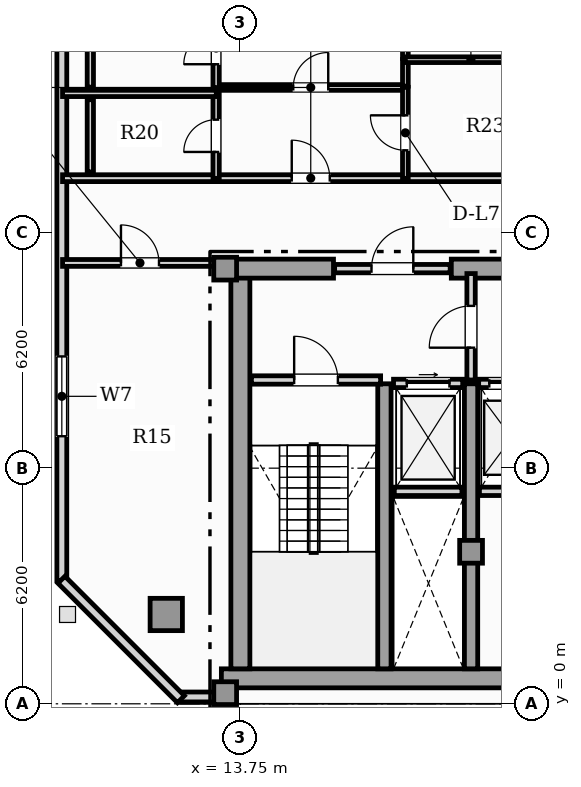
"""IFC4 building model, lengths in metres.
Left out: names, types, materials, properties, quantities, classifications, styles, units other than length and angle.
Written with IfcOpenShell. Run it as: python <this file> out.ifc"""

import sys

from ifc_helpers import new_model, si_unit, direction, frame, frame_2d, origin, origin_2d, place, context, subcontext, project, spatial, rectangle, hollow_rectangle, extrude, element, fill, save


model = new_model("IFC4")
c1 = context("Model", 3, precision=1e-05, world=origin(), true_north=direction((0.0, 1.0)))
c2 = subcontext(c1, "Body", "Model", "MODEL_VIEW")
j1 = project(units=[si_unit("LENGTHUNIT", "METRE"), si_unit("PLANEANGLEUNIT", "RADIAN")], contexts=[c1])
p1 = place(None, origin())
s1 = spatial("IfcSite", under=j1, at=p1, CompositionType="ELEMENT")
p2 = place(p1, origin())
s2 = spatial("IfcBuilding", under=s1, at=p2, CompositionType="ELEMENT")
p3 = place(p2, frame((0.0, 0.0, 313.05)))
s3 = spatial("IfcBuildingStorey", under=s2, at=p3, CompositionType="ELEMENT", Elevation=313.05)
p4 = place(p3, frame((13.25, 0.67, 0.0), z_axis=(0.0, 0.0, 1.0), x_axis=(1.0, 0.0, 0.0)))
e1 = element("IfcWall", 1, at=p4, inside=s3, PredefinedType="SHEAR", context=c2, shape_type="SweptSolid", body=[
    extrude(rectangle(XDim=31.0, YDim=0.5, at=frame_2d((15.5, 0.0))), origin(), (0.0, 0.0, 1.0), 3.65),
])
p5 = place(p3, frame((13.75, 0.92, 0.0), z_axis=(0.0, 0.0, 1.0), x_axis=(0.0, 1.0, 0.0)))
e2 = element("IfcWall", 2, at=p5, inside=s3, PredefinedType="SHEAR", context=c2, shape_type="SweptSolid", body=[
    extrude(rectangle(XDim=10.53, YDim=0.5, at=frame_2d((5.265, 0.0))), origin(), (0.0, 0.0, 1.0), 3.65),
])
p6 = place(p3, frame((13.25, 11.45, 0.0), z_axis=(0.0, 0.0, 1.0), x_axis=(1.0, 0.0, 0.0)))
e3 = element("IfcWall", 3, at=p6, inside=s3, PredefinedType="SHEAR", context=c2, shape_type="SweptSolid", body=[
    extrude(rectangle(XDim=2.95, YDim=0.5, at=frame_2d((1.475, 0.0))), origin(), (0.0, 0.0, 1.0), 3.65),
])
p7 = place(p3, frame((19.3, 11.45, 0.0), z_axis=(0.0, 0.0, 1.0), x_axis=(1.0, 0.0, 0.0)))
e4 = element("IfcWall", 4, at=p7, inside=s3, PredefinedType="SHEAR", context=c2, shape_type="SweptSolid", body=[
    extrude(rectangle(XDim=7.3, YDim=0.5, at=frame_2d((3.65, 0.0))), origin(), (0.0, 0.0, 1.0), 3.65),
])
for number, where, z_axis, x_axis in (
    (5, (17.54, 0.92, 0.0), (0.0, 0.0, 1.0), (0.0, 1.0, 0.0)),
    (6, (19.82, 0.92, 0.0), (0.0, 0.0, 1.0), (0.0, 1.0, 0.0)),
):
    element("IfcWall", number, at=place(p3, frame(where, z_axis=z_axis, x_axis=x_axis)), inside=s3, PredefinedType="SHEAR", context=c2, shape_type="SweptSolid", body=[
        extrude(rectangle(XDim=7.5, YDim=0.35, at=frame_2d((3.75, 0.0))), origin(), (0.0, 0.0, 1.0), 3.65),
    ])
for number, where, z_axis, x_axis in (
    (7, (13.35, 0.28, 0.0), (0.0, 0.0, 1.0), (1.0, 0.0, 0.0)),
    (8, (13.35, 11.45, 0.0), (0.0, 0.0, 1.0), (1.0, 0.0, 0.0)),
    (9, (19.82, 4.0, 0.0), (0.0, 0.0, 1.0), (1.0, 0.0, 0.0)),
):
    element("IfcColumn", number, at=place(p3, frame(where, z_axis=z_axis, x_axis=x_axis)), inside=s3, PredefinedType="COLUMN", context=c2, shape_type="SweptSolid", body=[
        extrude(rectangle(XDim=0.6, YDim=0.6, at=origin_2d()), origin(), (0.0, 0.0, 1.0), 3.85),
    ])
p8 = place(p3, frame((11.8, 2.35, 0.0), z_axis=(0.0, 0.0, 1.0), x_axis=(1.0, 0.0, 0.0)))
e10 = element("IfcColumn", 10, at=p8, inside=s3, PredefinedType="USERDEFINED", context=c2, shape_type="SweptSolid", body=[
    extrude(hollow_rectangle(XDim=0.85, YDim=0.85, WallThickness=0.05, at=origin_2d()), origin(), (0.0, 0.0, 1.0), 3.85),
])
p9 = place(p3, frame((12.162, 0.18, 0.0), z_axis=(0.0, 0.0, 1.0), x_axis=(1.0, 0.0, 0.0)))
e11 = element("IfcWall", 11, at=p9, inside=s3, PredefinedType="SOLIDWALL", context=c2, shape_type="SweptSolid", body=[
    extrude(rectangle(XDim=1.088, YDim=0.26, at=frame_2d((0.544, 0.0))), origin(), (0.0, 0.0, 1.0), 3.65),
])
p10 = place(p3, frame((9.052, 29.847, 0.0), z_axis=(0.0, 0.0, 1.0), x_axis=(0.0, -1.0, 0.0)))
e12 = element("IfcWall", 12, at=p10, inside=s3, PredefinedType="SOLIDWALL", context=c2, shape_type="SweptSolid", body=[
    extrude(rectangle(XDim=26.607, YDim=0.26, at=frame_2d((13.304, 0.0))), origin(), (0.0, 0.0, 1.0), 3.65),
])
p11 = place(p10, frame((20.707, 0.0, 0.85)))
e13 = element("IfcOpeningElement", 13, at=p11, cuts=e12, PredefinedType="OPENING", context=c2, shape_type="SweptSolid", body=[
    extrude(rectangle(XDim=2.1, YDim=2.05, at=frame_2d((1.05, 1.025))), frame((0.0, 0.14, 0.0), z_axis=(0.0, -1.0, 0.0), x_axis=(1.0, 0.0, 0.0)), (0.0, 0.0, 1.0), 0.28),
])
p12 = place(p10, frame((1.647, 0.0, 0.95)))
e14 = element("IfcOpeningElement", 14, at=p12, cuts=e12, PredefinedType="OPENING", context=c2, shape_type="SweptSolid", body=[
    extrude(rectangle(XDim=0.9, YDim=1.5, at=frame_2d((0.45, 0.75))), frame((0.0, 0.14, 0.0), z_axis=(0.0, -1.0, 0.0), x_axis=(1.0, 0.0, 0.0)), (0.0, 0.0, 1.0), 0.28),
])
p13 = place(p10, frame((6.453, 0.0, 0.9)))
e15 = element("IfcOpeningElement", 15, at=p13, cuts=e12, PredefinedType="OPENING", context=c2, shape_type="SweptSolid", body=[
    extrude(rectangle(XDim=1.5, YDim=1.95, at=frame_2d((0.75, 0.975))), frame((0.0, 0.14, 0.0), z_axis=(0.0, -1.0, 0.0), x_axis=(1.0, 0.0, 0.0)), (0.0, 0.0, 1.0), 0.28),
])
p14 = place(p3, frame((9.042, 3.264, 0.0), z_axis=(0.0, 0.0, 1.0), x_axis=(0.707106781187, -0.707106781187, 0.0)))
e16 = element("IfcWall", 16, at=p14, inside=s3, PredefinedType="SOLIDWALL", context=c2, shape_type="SweptSolid", body=[
    extrude(rectangle(XDim=4.446, YDim=0.26, at=frame_2d((2.223, 0.0))), origin(), (0.0, 0.0, 1.0), 3.65),
])
p15 = place(p3, frame((17.8, 5.59, 0.0), z_axis=(0.0, 0.0, 1.0), x_axis=(1.0, 0.0, 0.0)))
e17 = element("IfcWall", 17, at=p15, inside=s3, PredefinedType="SOLIDWALL", context=c2, shape_type="SweptSolid", body=[
    extrude(rectangle(XDim=1.78, YDim=0.22, at=frame_2d((0.89, 0.0))), origin(), (0.0, 0.0, 1.0), 3.65),
])
p16 = place(p3, frame((17.78, 8.43, 0.0), z_axis=(0.0, 0.0, 1.0), x_axis=(1.0, 0.0, 0.0)))
e18 = element("IfcWall", 18, at=p16, inside=s3, PredefinedType="SOLIDWALL", context=c2, shape_type="SweptSolid", body=[
    extrude(rectangle(XDim=1.82, YDim=0.22, at=frame_2d((0.91, 0.0))), origin(), (0.0, 0.0, 1.0), 3.65),
])
p17 = place(p16, frame((0.35, 0.0, 0.0)))
e19 = element("IfcOpeningElement", 19, at=p17, cuts=e18, PredefinedType="OPENING", context=c2, shape_type="SweptSolid", body=[
    extrude(rectangle(XDim=1.12, YDim=2.25, at=frame_2d((0.56, 1.125))), frame((0.0, 0.12, 0.0), z_axis=(0.0, -1.0, 0.0), x_axis=(1.0, 0.0, 0.0)), (0.0, 0.0, 1.0), 0.24),
])
p18 = place(p3, frame((20.04, 5.59, 0.0), z_axis=(0.0, 0.0, 1.0), x_axis=(1.0, 0.0, 0.0)))
e20 = element("IfcWall", 20, at=p18, inside=s3, PredefinedType="SOLIDWALL", context=c2, shape_type="SweptSolid", body=[
    extrude(rectangle(XDim=1.7, YDim=0.22, at=frame_2d((0.85, 0.0))), origin(), (0.0, 0.0, 1.0), 3.65),
])
p19 = place(p3, frame((20.02, 8.43, 0.0), z_axis=(0.0, 0.0, 1.0), x_axis=(1.0, 0.0, 0.0)))
e21 = element("IfcWall", 21, at=p19, inside=s3, PredefinedType="SOLIDWALL", context=c2, shape_type="SweptSolid", body=[
    extrude(rectangle(XDim=1.74, YDim=0.22, at=frame_2d((0.87, 0.0))), origin(), (0.0, 0.0, 1.0), 3.65),
])
p20 = place(p19, frame((0.28, 0.0, 0.0)))
e22 = element("IfcOpeningElement", 22, at=p20, cuts=e21, PredefinedType="OPENING", context=c2, shape_type="SweptSolid", body=[
    extrude(rectangle(XDim=1.18, YDim=2.2, at=frame_2d((0.59, 1.1))), frame((0.0, 0.12, 0.0), z_axis=(0.0, -1.0, 0.0), x_axis=(1.0, 0.0, 0.0)), (0.0, 0.0, 1.0), 0.24),
])
p21 = place(p3, frame((14.04, 8.52, 0.0), z_axis=(0.0, 0.0, 1.0), x_axis=(1.0, 0.0, 0.0)))
e23 = element("IfcWall", 23, at=p21, inside=s3, PredefinedType="SOLIDWALL", context=c2, shape_type="SweptSolid", body=[
    extrude(rectangle(XDim=3.4, YDim=0.22, at=frame_2d((1.7, 0.0))), origin(), (0.0, 0.0, 1.0), 3.65),
])
p22 = place(p21, frame((1.125, 0.0, 0.0)))
e24 = element("IfcOpeningElement", 24, at=p22, cuts=e23, PredefinedType="OPENING", context=c2, shape_type="SweptSolid", body=[
    extrude(rectangle(XDim=1.15, YDim=2.2, at=frame_2d((0.575, 1.1))), frame((0.0, 0.12, 0.0), z_axis=(0.0, -1.0, 0.0), x_axis=(1.0, 0.0, 0.0)), (0.0, 0.0, 1.0), 0.24),
])
p23 = place(p3, frame((19.82, 8.52, 0.0), z_axis=(0.0, 0.0, 1.0), x_axis=(0.0, 1.0, 0.0)))
e25 = element("IfcWall", 25, at=p23, inside=s3, PredefinedType="SOLIDWALL", context=c2, shape_type="SweptSolid", body=[
    extrude(rectangle(XDim=2.8, YDim=0.22, at=frame_2d((1.4, 0.0))), origin(), (0.0, 0.0, 1.0), 3.105),
])
p24 = place(p23, frame((0.85, 0.0, 0.0)))
e26 = element("IfcOpeningElement", 26, at=p24, cuts=e25, PredefinedType="OPENING", context=c2, shape_type="SweptSolid", body=[
    extrude(rectangle(XDim=1.1, YDim=2.2, at=frame_2d((0.55, 1.1))), frame((0.0, 0.12, 0.0), z_axis=(0.0, -1.0, 0.0), x_axis=(1.0, 0.0, 0.0)), (0.0, 0.0, 1.0), 0.24),
])
p25 = place(p3, frame((16.23, 11.45, 0.0), z_axis=(0.0, 0.0, 1.0), x_axis=(1.0, 0.0, 0.0)))
e27 = element("IfcWall", 27, at=p25, inside=s3, PredefinedType="SOLIDWALL", context=c2, shape_type="SweptSolid", body=[
    extrude(rectangle(XDim=3.04, YDim=0.22, at=frame_2d((1.52, 0.0))), origin(), (0.0, 0.0, 1.0), 3.65),
])
p26 = place(p25, frame((0.97, 0.0, 0.0)))
e28 = element("IfcOpeningElement", 28, at=p26, cuts=e27, PredefinedType="OPENING", context=c2, shape_type="SweptSolid", body=[
    extrude(rectangle(XDim=1.1, YDim=2.2, at=frame_2d((0.55, 1.1))), frame((0.0, 0.12, 0.0), z_axis=(0.0, -1.0, 0.0), x_axis=(1.0, 0.0, 0.0)), (0.0, 0.0, 1.0), 0.24),
])
p27 = place(p3, frame((9.071, 11.6, 0.0), z_axis=(0.0, 0.0, 1.0), x_axis=(1.0, 0.0, 0.0)))
e29 = element("IfcWall", 29, at=p27, inside=s3, PredefinedType="PARTITIONING", context=c2, shape_type="SweptSolid", body=[
    extrude(rectangle(XDim=4.074, YDim=0.18, at=frame_2d((2.037, 0.0))), origin(), (0.0, 0.0, 1.0), 3.65),
])
p28 = place(p27, frame((1.537, 0.0, 0.0)))
e30 = element("IfcOpeningElement", 30, at=p28, cuts=e29, PredefinedType="OPENING", context=c2, shape_type="SweptSolid", body=[
    extrude(rectangle(XDim=1.0, YDim=2.15, at=frame_2d((0.5, 1.075))), frame((0.0, 0.1, 0.0), z_axis=(0.0, -1.0, 0.0), x_axis=(1.0, 0.0, 0.0)), (0.0, 0.0, 1.0), 0.2),
])
p29 = place(p3, frame((13.107, 13.83, 0.0), z_axis=(0.0, 0.0, 1.0), x_axis=(1.0, 0.0, 0.0)))
e31 = element("IfcWall", 31, at=p29, inside=s3, PredefinedType="PARTITIONING", context=c2, shape_type="SweptSolid", body=[
    extrude(rectangle(XDim=4.99, YDim=0.18, at=frame_2d((2.495, 0.0))), origin(), (0.0, 0.0, 1.0), 3.65),
])
p30 = place(p29, frame((1.995, 0.0, 0.0)))
e32 = element("IfcOpeningElement", 32, at=p30, cuts=e31, PredefinedType="OPENING", context=c2, shape_type="SweptSolid", body=[
    extrude(rectangle(XDim=1.0, YDim=2.15, at=frame_2d((0.5, 1.075))), frame((0.0, 0.1, 0.0), z_axis=(0.0, -1.0, 0.0), x_axis=(1.0, 0.0, 0.0)), (0.0, 0.0, 1.0), 0.2),
])
p31 = place(p3, frame((9.071, 13.83, 0.0), z_axis=(0.0, 0.0, 1.0), x_axis=(1.0, 0.0, 0.0)))
e33 = element("IfcWall", 33, at=p31, inside=s3, PredefinedType="PARTITIONING", context=c2, shape_type="SweptSolid", body=[
    extrude(rectangle(XDim=4.005, YDim=0.18, at=frame_2d((2.003, 0.0))), origin(), (0.0, 0.0, 1.0), 3.65),
])
p32 = place(p3, frame((18.127, 13.83, 0.0), z_axis=(0.0, 0.0, 1.0), x_axis=(1.0, 0.0, 0.0)))
e34 = element("IfcWall", 34, at=p32, inside=s3, PredefinedType="PARTITIONING", context=c2, shape_type="SweptSolid", body=[
    extrude(rectangle(XDim=3.418, YDim=0.18, at=frame_2d((1.709, 0.0))), origin(), (0.0, 0.0, 1.0), 3.65),
])
p33 = place(p3, frame((13.107, 16.217, 0.0), z_axis=(0.0, 0.0, 1.0), x_axis=(1.0, 0.0, 0.0)))
e35 = element("IfcWall", 35, at=p33, inside=s3, PredefinedType="PARTITIONING", context=c2, shape_type="SweptSolid", body=[
    extrude(rectangle(XDim=4.99, YDim=0.15, at=frame_2d((2.495, 0.0))), origin(), (0.0, 0.0, 1.0), 3.65),
])
p34 = place(p33, frame((2.035, 0.0, 0.0)))
e36 = element("IfcOpeningElement", 36, at=p34, cuts=e35, PredefinedType="OPENING", context=c2, shape_type="SweptSolid", body=[
    extrude(rectangle(XDim=0.92, YDim=2.1, at=frame_2d((0.46, 1.05))), frame((0.0, 0.085, 0.0), z_axis=(0.0, -1.0, 0.0), x_axis=(1.0, 0.0, 0.0)), (0.0, 0.0, 1.0), 0.17),
])
p35 = place(p3, frame((13.112, 13.825, 0.0), z_axis=(0.0, 0.0, 1.0), x_axis=(0.0, 1.0, 0.0)))
e37 = element("IfcWall", 37, at=p35, inside=s3, PredefinedType="PLUMBINGWALL", context=c2, shape_type="SweptSolid", body=[
    extrude(rectangle(XDim=2.24, YDim=0.165, at=frame_2d((1.12, 0.0))), origin(), (0.0, 0.0, 1.0), 3.65),
])
p36 = place(p35, frame((0.695, 0.0, 0.0)))
e38 = element("IfcOpeningElement", 38, at=p36, cuts=e37, PredefinedType="OPENING", context=c2, shape_type="SweptSolid", body=[
    extrude(rectangle(XDim=0.85, YDim=2.1, at=frame_2d((0.425, 1.05))), frame((0.0, 0.093, 0.0), z_axis=(0.0, -1.0, 0.0), x_axis=(1.0, 0.0, 0.0)), (0.0, 0.0, 1.0), 0.185),
])
p37 = place(p3, frame((18.092, 13.825, 0.0), z_axis=(0.0, 0.0, 1.0), x_axis=(0.0, 1.0, 0.0)))
e39 = element("IfcWall", 39, at=p37, inside=s3, PredefinedType="PARTITIONING", context=c2, shape_type="SweptSolid", body=[
    extrude(rectangle(XDim=2.397, YDim=0.15, at=frame_2d((1.198, 0.0))), origin(), (0.0, 0.0, 1.0), 3.65),
])
p38 = place(p37, frame((0.738, 0.0, 0.0)))
e40 = element("IfcOpeningElement", 40, at=p38, cuts=e39, PredefinedType="OPENING", context=c2, shape_type="SweptSolid", body=[
    extrude(rectangle(XDim=0.92, YDim=2.1, at=frame_2d((0.46, 1.05))), frame((0.0, 0.085, 0.0), z_axis=(0.0, -1.0, 0.0), x_axis=(1.0, 0.0, 0.0)), (0.0, 0.0, 1.0), 0.17),
])
p39 = place(p3, frame((13.112, 16.212, 0.0), z_axis=(0.0, 0.0, 1.0), x_axis=(0.0, 1.0, 0.0)))
e41 = element("IfcWall", 41, at=p39, inside=s3, PredefinedType="PLUMBINGWALL", context=c2, shape_type="SweptSolid", body=[
    extrude(rectangle(XDim=2.083, YDim=0.165, at=frame_2d((1.042, 0.0))), origin(), (0.0, 0.0, 1.0), 3.65),
])
p40 = place(p39, frame((0.616, 0.0, 0.0)))
e42 = element("IfcOpeningElement", 42, at=p40, cuts=e41, PredefinedType="OPENING", context=c2, shape_type="SweptSolid", body=[
    extrude(rectangle(XDim=0.85, YDim=2.1, at=frame_2d((0.425, 1.05))), frame((0.0, 0.093, 0.0), z_axis=(0.0, -1.0, 0.0), x_axis=(1.0, 0.0, 0.0)), (0.0, 0.0, 1.0), 0.185),
])
p41 = place(p3, frame((18.092, 16.252, 0.0), z_axis=(0.0, 0.0, 1.0), x_axis=(0.0, 1.0, 0.0)))
e43 = element("IfcWall", 43, at=p41, inside=s3, PredefinedType="PARTITIONING", context=c2, shape_type="SweptSolid", body=[
    extrude(rectangle(XDim=0.701, YDim=0.15, at=frame_2d((0.35, 0.0))), origin(), (0.0, 0.0, 1.0), 3.65),
])
p42 = place(p3, frame((18.092, 16.982, 0.0), z_axis=(0.0, 0.0, 1.0), x_axis=(0.0, 1.0, 0.0)))
e44 = element("IfcWall", 44, at=p42, inside=s3, PredefinedType="PARTITIONING", context=c2, shape_type="SweptSolid", body=[
    extrude(rectangle(XDim=10.022, YDim=0.15, at=frame_2d((5.011, 0.0))), origin(), (0.0, 0.0, 1.0), 3.65),
])
p43 = place(p42, frame((4.551, 0.0, 0.0)))
e45 = element("IfcOpeningElement", 45, at=p43, cuts=e44, PredefinedType="OPENING", context=c2, shape_type="SweptSolid", body=[
    extrude(rectangle(XDim=0.92, YDim=2.1, at=frame_2d((0.46, 1.05))), frame((0.0, 0.085, 0.0), z_axis=(0.0, -1.0, 0.0), x_axis=(1.0, 0.0, 0.0)), (0.0, 0.0, 1.0), 0.17),
])
p44 = place(p3, frame((9.071, 16.06, 0.0), z_axis=(0.0, 0.0, 1.0), x_axis=(1.0, 0.0, 0.0)))
e46 = element("IfcWall", 46, at=p44, inside=s3, PredefinedType="PLUMBINGWALL", context=c2, shape_type="SweptSolid", body=[
    extrude(rectangle(XDim=4.045, YDim=0.165, at=frame_2d((2.023, 0.0))), origin(), (0.0, 0.0, 1.0), 3.65),
])
p45 = place(p3, frame((18.087, 16.947, 0.0), z_axis=(0.0, 0.0, 1.0), x_axis=(1.0, 0.0, 0.0)))
e47 = element("IfcWall", 47, at=p45, inside=s3, PredefinedType="PARTITIONING", context=c2, shape_type="SweptSolid", body=[
    extrude(rectangle(XDim=3.458, YDim=0.15, at=frame_2d((1.729, 0.0))), origin(), (0.0, 0.0, 1.0), 3.65),
])
for number, where, z_axis, x_axis in (
    (48, (9.802, 13.995, 0.0), (0.0, 0.0, 1.0), (0.0, 1.0, 0.0)),
    (49, (9.802, 16.225, 0.0), (0.0, 0.0, 1.0), (0.0, 1.0, 0.0)),
):
    element("IfcWall", number, at=place(p3, frame(where, z_axis=z_axis, x_axis=x_axis)), inside=s3, PredefinedType="PLUMBINGWALL", context=c2, shape_type="SweptSolid", body=[
        extrude(rectangle(XDim=1.9, YDim=0.165, at=frame_2d((0.95, 0.0))), origin(), (0.0, 0.0, 1.0), 3.65),
    ])
p46 = place(p11, origin())
e50 = element("IfcWindow", 50, at=p46, inside=s3, PartitioningType="SINGLE_PANEL", PredefinedType="WINDOW", context=c2, shape_type="SweptSolid", body=[
    extrude(rectangle(XDim=2.1, YDim=2.05, at=frame_2d((1.05, 1.025))), frame((0.0, 0.03, 0.0), z_axis=(0.0, -1.0, 0.0), x_axis=(1.0, 0.0, 0.0)), (0.0, 0.0, 1.0), 0.06),
])
fill(e13, e50)
p47 = place(p17, origin())
e51 = element("IfcDoor", 51, at=p47, inside=s3, OperationType="SLIDING_TO_RIGHT", PredefinedType="DOOR", context=c2, shape_type="SweptSolid", body=[
    extrude(rectangle(XDim=1.12, YDim=2.25, at=frame_2d((0.56, 1.125))), frame((0.0, 0.025, 0.0), z_axis=(0.0, -1.0, 0.0), x_axis=(1.0, 0.0, 0.0)), (0.0, 0.0, 1.0), 0.05),
])
fill(e19, e51)
p48 = place(p20, origin())
e52 = element("IfcDoor", 52, at=p48, inside=s3, OperationType="SLIDING_TO_LEFT", PredefinedType="DOOR", context=c2, shape_type="SweptSolid", body=[
    extrude(rectangle(XDim=1.18, YDim=2.2, at=frame_2d((0.59, 1.1))), frame((0.0, 0.025, 0.0), z_axis=(0.0, -1.0, 0.0), x_axis=(1.0, 0.0, 0.0)), (0.0, 0.0, 1.0), 0.05),
])
fill(e22, e52)
p49 = place(p22, origin())
e53 = element("IfcDoor", 53, at=p49, inside=s3, OperationType="SINGLE_SWING_LEFT", PredefinedType="DOOR", context=c2, shape_type="SweptSolid", body=[
    extrude(rectangle(XDim=1.15, YDim=2.2, at=frame_2d((0.575, 1.1))), frame((0.0, 0.025, 0.0), z_axis=(0.0, -1.0, 0.0), x_axis=(1.0, 0.0, 0.0)), (0.0, 0.0, 1.0), 0.05),
])
fill(e24, e53)
p50 = place(p24, origin())
e54 = element("IfcDoor", 54, at=p50, inside=s3, OperationType="SINGLE_SWING_LEFT", PredefinedType="DOOR", context=c2, shape_type="SweptSolid", body=[
    extrude(rectangle(XDim=1.1, YDim=2.2, at=frame_2d((0.55, 1.1))), frame((0.0, 0.025, 0.0), z_axis=(0.0, -1.0, 0.0), x_axis=(1.0, 0.0, 0.0)), (0.0, 0.0, 1.0), 0.05),
])
fill(e26, e54)
p51 = place(p26, origin())
e55 = element("IfcDoor", 55, at=p51, inside=s3, OperationType="SINGLE_SWING_RIGHT", PredefinedType="DOOR", context=c2, shape_type="SweptSolid", body=[
    extrude(rectangle(XDim=1.1, YDim=2.2, at=frame_2d((0.55, 1.1))), frame((0.0, 0.025, 0.0), z_axis=(0.0, -1.0, 0.0), x_axis=(1.0, 0.0, 0.0)), (0.0, 0.0, 1.0), 0.05),
])
fill(e28, e55)
p52 = place(p28, origin())
e56 = element("IfcDoor", 56, at=p52, inside=s3, OperationType="SINGLE_SWING_LEFT", PredefinedType="DOOR", context=c2, shape_type="SweptSolid", body=[
    extrude(rectangle(XDim=1.0, YDim=2.15, at=frame_2d((0.5, 1.075))), frame((0.0, 0.025, 0.0), z_axis=(0.0, -1.0, 0.0), x_axis=(1.0, 0.0, 0.0)), (0.0, 0.0, 1.0), 0.05),
])
fill(e30, e56)
p53 = place(p30, origin())
e57 = element("IfcDoor", 57, at=p53, inside=s3, OperationType="SINGLE_SWING_LEFT", PredefinedType="DOOR", context=c2, shape_type="SweptSolid", body=[
    extrude(rectangle(XDim=1.0, YDim=2.15, at=frame_2d((0.5, 1.075))), frame((0.0, 0.025, 0.0), z_axis=(0.0, -1.0, 0.0), x_axis=(1.0, 0.0, 0.0)), (0.0, 0.0, 1.0), 0.05),
])
fill(e32, e57)
p54 = place(p34, origin())
e58 = element("IfcDoor", 58, at=p54, inside=s3, OperationType="SINGLE_SWING_RIGHT", PredefinedType="DOOR", context=c2, shape_type="SweptSolid", body=[
    extrude(rectangle(XDim=0.92, YDim=2.1, at=frame_2d((0.46, 1.05))), frame((0.0, 0.025, 0.0), z_axis=(0.0, -1.0, 0.0), x_axis=(1.0, 0.0, 0.0)), (0.0, 0.0, 1.0), 0.05),
])
fill(e36, e58)
p55 = place(p36, origin())
e59 = element("IfcDoor", 59, at=p55, inside=s3, OperationType="SINGLE_SWING_LEFT", PredefinedType="DOOR", context=c2, shape_type="SweptSolid", body=[
    extrude(rectangle(XDim=0.85, YDim=2.1, at=frame_2d((0.425, 1.05))), frame((0.0, 0.025, 0.0), z_axis=(0.0, -1.0, 0.0), x_axis=(1.0, 0.0, 0.0)), (0.0, 0.0, 1.0), 0.05),
])
fill(e38, e59)
p56 = place(p38, origin())
e60 = element("IfcDoor", 60, at=p56, inside=s3, OperationType="SINGLE_SWING_RIGHT", PredefinedType="DOOR", context=c2, shape_type="SweptSolid", body=[
    extrude(rectangle(XDim=0.92, YDim=2.1, at=frame_2d((0.46, 1.05))), frame((0.0, 0.025, 0.0), z_axis=(0.0, -1.0, 0.0), x_axis=(1.0, 0.0, 0.0)), (0.0, 0.0, 1.0), 0.05),
])
fill(e40, e60)
p57 = place(p40, origin())
e61 = element("IfcDoor", 61, at=p57, inside=s3, OperationType="SINGLE_SWING_LEFT", PredefinedType="DOOR", context=c2, shape_type="SweptSolid", body=[
    extrude(rectangle(XDim=0.85, YDim=2.1, at=frame_2d((0.425, 1.05))), frame((0.0, 0.025, 0.0), z_axis=(0.0, -1.0, 0.0), x_axis=(1.0, 0.0, 0.0)), (0.0, 0.0, 1.0), 0.05),
])
fill(e42, e61)
save(model, sys.argv[1])
